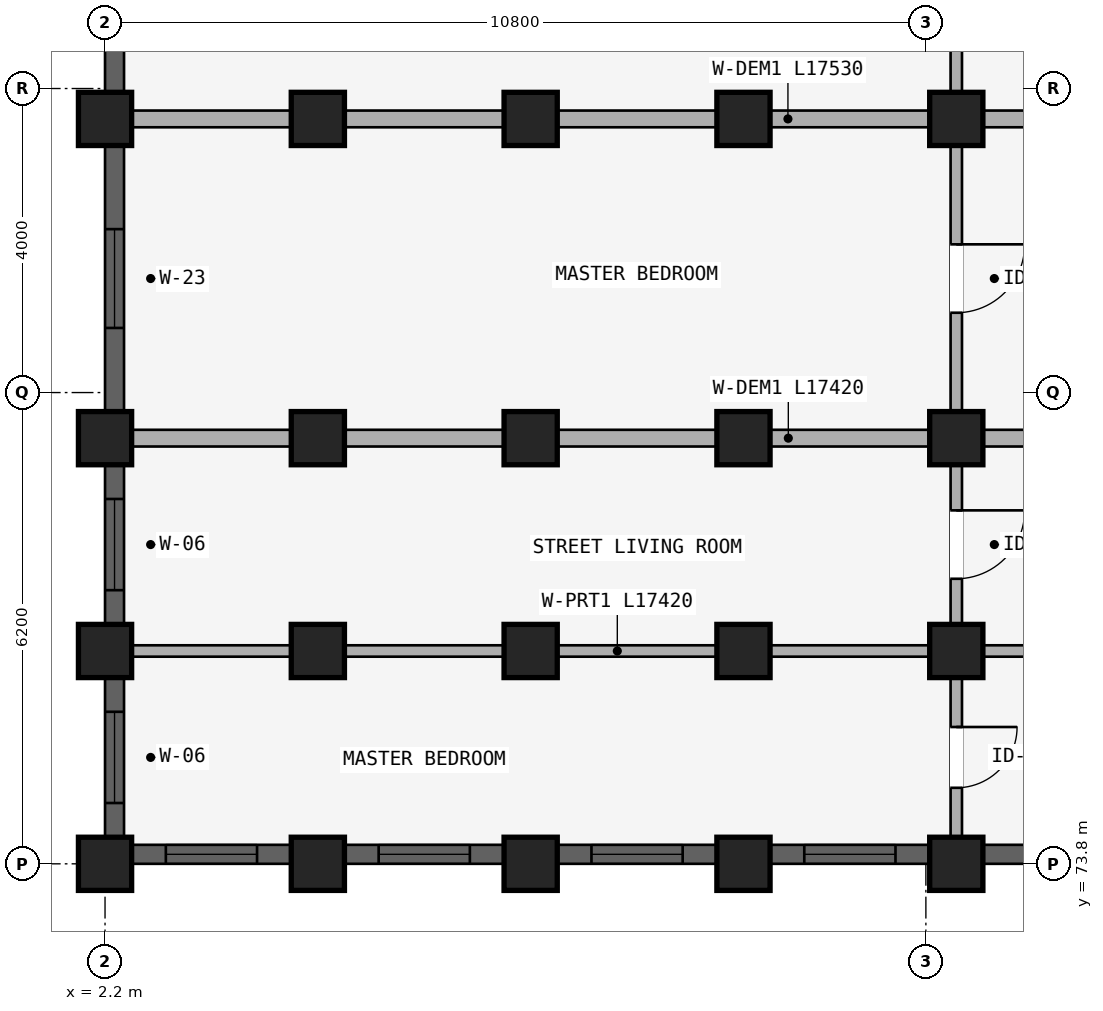
"""IFC4 building model, lengths in metres.
Left out: names, types, materials, properties, quantities, classifications, styles, units other than length and angle.
Written with IfcOpenShell. Run it as: python <this file> out.ifc"""

import sys

from ifc_helpers import new_model, si_unit, direction, frame, frame_2d, origin, origin_2d, place, context, subcontext, project, spatial, rectangle, extrude, element, fill, save


model = new_model("IFC4")
c1 = context("Model", 3, precision=1e-05, world=origin(), true_north=direction((0.0, 1.0)))
c2 = subcontext(c1, "Body", "Model", "MODEL_VIEW")
j1 = project(units=[si_unit("LENGTHUNIT", "METRE"), si_unit("PLANEANGLEUNIT", "RADIAN")], contexts=[c1])
p1 = place(None, origin())
s1 = spatial("IfcSite", under=j1, at=p1, CompositionType="ELEMENT")
p2 = place(p1, origin())
s2 = spatial("IfcBuilding", under=s1, at=p2, CompositionType="ELEMENT")
p3 = place(p2, frame((0.0, 0.0, 18.15)))
s3 = spatial("IfcBuildingStorey", under=s2, at=p3, CompositionType="ELEMENT", Elevation=18.15)
for number, where, z_axis, x_axis in (
    (1, (13.4, 83.6, 0.0), (0.0, 0.0, 1.0), (1.0, 0.0, 0.0)),
    (2, (10.6, 83.6, 0.0), (0.0, 0.0, 1.0), (1.0, 0.0, 0.0)),
    (3, (7.8, 83.6, 0.0), (0.0, 0.0, 1.0), (1.0, 0.0, 0.0)),
    (4, (5.0, 83.6, 0.0), (0.0, 0.0, 1.0), (1.0, 0.0, 0.0)),
    (5, (2.2, 83.6, 0.0), (0.0, 0.0, 1.0), (1.0, 0.0, 0.0)),
    (6, (13.4, 79.4, 0.0), (0.0, 0.0, 1.0), (1.0, 0.0, 0.0)),
    (7, (10.6, 79.4, 0.0), (0.0, 0.0, 1.0), (1.0, 0.0, 0.0)),
    (8, (7.8, 79.4, 0.0), (0.0, 0.0, 1.0), (1.0, 0.0, 0.0)),
    (9, (5.0, 79.4, 0.0), (0.0, 0.0, 1.0), (1.0, 0.0, 0.0)),
    (10, (2.2, 79.4, 0.0), (0.0, 0.0, 1.0), (1.0, 0.0, 0.0)),
    (11, (13.4, 76.6, 0.0), (0.0, 0.0, 1.0), (1.0, 0.0, 0.0)),
    (12, (10.6, 76.6, 0.0), (0.0, 0.0, 1.0), (1.0, 0.0, 0.0)),
    (13, (7.8, 76.6, 0.0), (0.0, 0.0, 1.0), (1.0, 0.0, 0.0)),
    (14, (5.0, 76.6, 0.0), (0.0, 0.0, 1.0), (1.0, 0.0, 0.0)),
    (15, (2.2, 76.6, 0.0), (0.0, 0.0, 1.0), (1.0, 0.0, 0.0)),
    (16, (13.4, 73.8, 0.0), (0.0, 0.0, 1.0), (1.0, 0.0, 0.0)),
    (17, (10.6, 73.8, 0.0), (0.0, 0.0, 1.0), (1.0, 0.0, 0.0)),
    (18, (7.8, 73.8, 0.0), (0.0, 0.0, 1.0), (1.0, 0.0, 0.0)),
    (19, (5.0, 73.8, 0.0), (0.0, 0.0, 1.0), (1.0, 0.0, 0.0)),
    (20, (2.2, 73.8, 0.0), (0.0, 0.0, 1.0), (1.0, 0.0, 0.0)),
):
    element("IfcColumn", number, at=place(p3, frame(where, z_axis=z_axis, x_axis=x_axis)), inside=s3, PredefinedType="COLUMN", context=c2, shape_type="SweptSolid", body=[
        extrude(rectangle(XDim=0.7, YDim=0.7, at=origin_2d()), origin(), (0.0, 0.0, 1.0), 2.93),
    ])
p4 = place(p3, frame((13.4, 87.57, 0.0), z_axis=(0.0, 0.0, 1.0), x_axis=(0.0, -1.0, 0.0)))
e21 = element("IfcWall", 21, at=p4, inside=s3, PredefinedType="PARTITIONING", context=c2, shape_type="SweptSolid", body=[
    extrude(rectangle(XDim=3.89, YDim=0.15, at=frame_2d((1.945, 0.0))), origin(), (0.0, 0.0, 1.0), 2.372),
])
p5 = place(p4, frame((1.495, 0.0, 0.0)))
e22 = element("IfcOpeningElement", 22, at=p5, cuts=e21, PredefinedType="OPENING", context=c2, shape_type="SweptSolid", body=[
    extrude(rectangle(XDim=0.9, YDim=2.1, at=frame_2d((0.45, 1.05))), frame((0.0, 0.085, 0.0), z_axis=(0.0, -1.0, 0.0), x_axis=(1.0, 0.0, 0.0)), (0.0, 0.0, 1.0), 0.17),
])
p6 = place(p3, frame((13.4, 83.52, 0.0), z_axis=(0.0, 0.0, 1.0), x_axis=(0.0, -1.0, 0.0)))
e23 = element("IfcWall", 23, at=p6, inside=s3, PredefinedType="PARTITIONING", context=c2, shape_type="SweptSolid", body=[
    extrude(rectangle(XDim=4.04, YDim=0.15, at=frame_2d((2.02, 0.0))), origin(), (0.0, 0.0, 1.0), 2.372),
])
p7 = place(p6, frame((1.57, 0.0, 0.0)))
e24 = element("IfcOpeningElement", 24, at=p7, cuts=e23, PredefinedType="OPENING", context=c2, shape_type="SweptSolid", body=[
    extrude(rectangle(XDim=0.9, YDim=2.1, at=frame_2d((0.45, 1.05))), frame((0.0, 0.085, 0.0), z_axis=(0.0, -1.0, 0.0), x_axis=(1.0, 0.0, 0.0)), (0.0, 0.0, 1.0), 0.17),
])
p8 = place(p3, frame((19.95, 83.6, 0.0), z_axis=(0.0, 0.0, 1.0), x_axis=(-1.0, 0.0, 0.0)))
e25 = element("IfcWall", 25, at=p8, inside=s3, PredefinedType="STANDARD", context=c2, shape_type="SweptSolid", body=[
    extrude(rectangle(XDim=17.53, YDim=0.22, at=frame_2d((8.765, 0.0))), origin(), (0.0, 0.0, 1.0), 2.372),
])
p9 = place(p3, frame((13.4, 79.32, 0.0), z_axis=(0.0, 0.0, 1.0), x_axis=(0.0, -1.0, 0.0)))
e26 = element("IfcWall", 26, at=p9, inside=s3, PredefinedType="PLUMBINGWALL", context=c2, shape_type="SweptSolid", body=[
    extrude(rectangle(XDim=2.64, YDim=0.15, at=frame_2d((1.32, 0.0))), origin(), (0.0, 0.0, 1.0), 2.372),
])
p10 = place(p9, frame((0.87, 0.0, 0.0)))
e27 = element("IfcOpeningElement", 27, at=p10, cuts=e26, PredefinedType="OPENING", context=c2, shape_type="SweptSolid", body=[
    extrude(rectangle(XDim=0.9, YDim=2.1, at=frame_2d((0.45, 1.05))), frame((0.0, 0.085, 0.0), z_axis=(0.0, -1.0, 0.0), x_axis=(1.0, 0.0, 0.0)), (0.0, 0.0, 1.0), 0.17),
])
p11 = place(p3, frame((19.9, 79.4, 0.0), z_axis=(0.0, 0.0, 1.0), x_axis=(-1.0, 0.0, 0.0)))
e28 = element("IfcWall", 28, at=p11, inside=s3, PredefinedType="STANDARD", context=c2, shape_type="SweptSolid", body=[
    extrude(rectangle(XDim=17.42, YDim=0.22, at=frame_2d((8.71, 0.0))), origin(), (0.0, 0.0, 1.0), 2.372),
])
p12 = place(p3, frame((13.4, 76.52, 0.0), z_axis=(0.0, 0.0, 1.0), x_axis=(0.0, -1.0, 0.0)))
e29 = element("IfcWall", 29, at=p12, inside=s3, PredefinedType="PLUMBINGWALL", context=c2, shape_type="SweptSolid", body=[
    extrude(rectangle(XDim=2.64, YDim=0.15, at=frame_2d((1.32, 0.0))), origin(), (0.0, 0.0, 1.0), 2.372),
])
p13 = place(p12, frame((0.92, 0.0, 0.0)))
e30 = element("IfcOpeningElement", 30, at=p13, cuts=e29, PredefinedType="OPENING", context=c2, shape_type="SweptSolid", body=[
    extrude(rectangle(XDim=0.8, YDim=2.1, at=frame_2d((0.4, 1.05))), frame((0.0, 0.085, 0.0), z_axis=(0.0, -1.0, 0.0), x_axis=(1.0, 0.0, 0.0)), (0.0, 0.0, 1.0), 0.17),
])
p14 = place(p3, frame((19.9, 76.6, 0.0), z_axis=(0.0, 0.0, 1.0), x_axis=(-1.0, 0.0, 0.0)))
e31 = element("IfcWall", 31, at=p14, inside=s3, PredefinedType="PARTITIONING", context=c2, shape_type="SweptSolid", body=[
    extrude(rectangle(XDim=17.42, YDim=0.15, at=frame_2d((8.71, 0.0))), origin(), (0.0, 0.0, 1.0), 2.372),
])
p15 = place(p14, frame((2.75, 0.0, 0.0)))
e32 = element("IfcOpeningElement", 32, at=p15, cuts=e31, PredefinedType="OPENING", context=c2, shape_type="SweptSolid", body=[
    extrude(rectangle(XDim=0.9, YDim=2.1, at=frame_2d((0.45, 1.05))), frame((0.0, 0.085, 0.0), z_axis=(0.0, -1.0, 0.0), x_axis=(1.0, 0.0, 0.0)), (0.0, 0.0, 1.0), 0.17),
])
p16 = place(p3, frame((2.325, 87.447, 0.0), z_axis=(0.0, 0.0, 1.0), x_axis=(0.0, -1.0, 0.0)))
e33 = element("IfcWall", 33, at=p16, inside=s3, PredefinedType="STANDARD", context=c2, shape_type="SweptSolid", body=[
    extrude(rectangle(XDim=3.493, YDim=0.25, at=frame_2d((1.747, 0.0))), origin(), (0.0, 0.0, 1.0), 2.472),
])
p17 = place(p16, frame((1.096, 0.0, 0.88)))
e34 = element("IfcOpeningElement", 34, at=p17, cuts=e33, PredefinedType="OPENING", context=c2, shape_type="SweptSolid", body=[
    extrude(rectangle(XDim=1.3, YDim=1.4, at=frame_2d((0.65, 0.7))), frame((0.0, 0.135, 0.0), z_axis=(0.0, -1.0, 0.0), x_axis=(1.0, 0.0, 0.0)), (0.0, 0.0, 1.0), 0.27),
])
p18 = place(p3, frame((2.325, 83.247, 0.0), z_axis=(0.0, 0.0, 1.0), x_axis=(0.0, -1.0, 0.0)))
e35 = element("IfcWall", 35, at=p18, inside=s3, PredefinedType="STANDARD", context=c2, shape_type="SweptSolid", body=[
    extrude(rectangle(XDim=3.493, YDim=0.25, at=frame_2d((1.747, 0.0))), origin(), (0.0, 0.0, 1.0), 2.472),
])
p19 = place(p18, frame((1.096, 0.0, 0.88)))
e36 = element("IfcOpeningElement", 36, at=p19, cuts=e35, PredefinedType="OPENING", context=c2, shape_type="SweptSolid", body=[
    extrude(rectangle(XDim=1.3, YDim=1.4, at=frame_2d((0.65, 0.7))), frame((0.0, 0.135, 0.0), z_axis=(0.0, -1.0, 0.0), x_axis=(1.0, 0.0, 0.0)), (0.0, 0.0, 1.0), 0.27),
])
p20 = place(p3, frame((2.325, 79.046, 0.0), z_axis=(0.0, 0.0, 1.0), x_axis=(0.0, -1.0, 0.0)))
e37 = element("IfcWall", 37, at=p20, inside=s3, PredefinedType="STANDARD", context=c2, shape_type="SweptSolid", body=[
    extrude(rectangle(XDim=2.093, YDim=0.25, at=frame_2d((1.046, 0.0))), origin(), (0.0, 0.0, 1.0), 2.472),
])
p21 = place(p20, frame((0.447, 0.0, 0.772)))
e38 = element("IfcOpeningElement", 38, at=p21, cuts=e37, PredefinedType="OPENING", context=c2, shape_type="SweptSolid", body=[
    extrude(rectangle(XDim=1.2, YDim=1.5, at=frame_2d((0.6, 0.75))), frame((0.0, 0.135, 0.0), z_axis=(0.0, -1.0, 0.0), x_axis=(1.0, 0.0, 0.0)), (0.0, 0.0, 1.0), 0.27),
])
p22 = place(p3, frame((2.325, 76.247, 0.0), z_axis=(0.0, 0.0, 1.0), x_axis=(0.0, -1.0, 0.0)))
e39 = element("IfcWall", 39, at=p22, inside=s3, PredefinedType="STANDARD", context=c2, shape_type="SweptSolid", body=[
    extrude(rectangle(XDim=2.093, YDim=0.25, at=frame_2d((1.046, 0.0))), origin(), (0.0, 0.0, 1.0), 2.472),
])
p23 = place(p22, frame((0.447, 0.0, 0.772)))
e40 = element("IfcOpeningElement", 40, at=p23, cuts=e39, PredefinedType="OPENING", context=c2, shape_type="SweptSolid", body=[
    extrude(rectangle(XDim=1.2, YDim=1.5, at=frame_2d((0.6, 0.75))), frame((0.0, 0.135, 0.0), z_axis=(0.0, -1.0, 0.0), x_axis=(1.0, 0.0, 0.0)), (0.0, 0.0, 1.0), 0.27),
])
p24 = place(p3, frame((19.771, 73.925, 0.0), z_axis=(0.0, 0.0, 1.0), x_axis=(-1.0, 0.0, 0.0)))
e41 = element("IfcWall", 41, at=p24, inside=s3, PredefinedType="STANDARD", context=c2, shape_type="SweptSolid", body=[
    extrude(rectangle(XDim=6.018, YDim=0.25, at=frame_2d((3.009, 0.0))), origin(), (0.0, 0.0, 1.0), 2.372),
])
p25 = place(p24, frame((2.322, 0.0, 0.522)))
e42 = element("IfcOpeningElement", 42, at=p25, cuts=e41, PredefinedType="OPENING", context=c2, shape_type="SweptSolid", body=[
    extrude(rectangle(XDim=1.5, YDim=1.65, at=frame_2d((0.75, 0.825))), frame((0.0, 0.135, 0.0), z_axis=(0.0, -1.0, 0.0), x_axis=(1.0, 0.0, 0.0)), (0.0, 0.0, 1.0), 0.27),
])
p26 = place(p3, frame((13.046, 73.925, 0.0), z_axis=(0.0, 0.0, 1.0), x_axis=(-1.0, 0.0, 0.0)))
e43 = element("IfcWall", 43, at=p26, inside=s3, PredefinedType="STANDARD", context=c2, shape_type="SweptSolid", body=[
    extrude(rectangle(XDim=2.093, YDim=0.25, at=frame_2d((1.046, 0.0))), origin(), (0.0, 0.0, 1.0), 2.372),
])
p27 = place(p26, frame((0.447, 0.0, 0.672)))
e44 = element("IfcOpeningElement", 44, at=p27, cuts=e43, PredefinedType="OPENING", context=c2, shape_type="SweptSolid", body=[
    extrude(rectangle(XDim=1.2, YDim=1.5, at=frame_2d((0.6, 0.75))), frame((0.0, 0.135, 0.0), z_axis=(0.0, -1.0, 0.0), x_axis=(1.0, 0.0, 0.0)), (0.0, 0.0, 1.0), 0.27),
])
p28 = place(p3, frame((10.247, 73.925, 0.0), z_axis=(0.0, 0.0, 1.0), x_axis=(-1.0, 0.0, 0.0)))
e45 = element("IfcWall", 45, at=p28, inside=s3, PredefinedType="STANDARD", context=c2, shape_type="SweptSolid", body=[
    extrude(rectangle(XDim=2.093, YDim=0.25, at=frame_2d((1.046, 0.0))), origin(), (0.0, 0.0, 1.0), 2.372),
])
p29 = place(p28, frame((0.447, 0.0, 0.672)))
e46 = element("IfcOpeningElement", 46, at=p29, cuts=e45, PredefinedType="OPENING", context=c2, shape_type="SweptSolid", body=[
    extrude(rectangle(XDim=1.2, YDim=1.5, at=frame_2d((0.6, 0.75))), frame((0.0, 0.135, 0.0), z_axis=(0.0, -1.0, 0.0), x_axis=(1.0, 0.0, 0.0)), (0.0, 0.0, 1.0), 0.27),
])
p30 = place(p3, frame((7.447, 73.925, 0.0), z_axis=(0.0, 0.0, 1.0), x_axis=(-1.0, 0.0, 0.0)))
e47 = element("IfcWall", 47, at=p30, inside=s3, PredefinedType="STANDARD", context=c2, shape_type="SweptSolid", body=[
    extrude(rectangle(XDim=2.093, YDim=0.25, at=frame_2d((1.046, 0.0))), origin(), (0.0, 0.0, 1.0), 2.372),
])
p31 = place(p30, frame((0.447, 0.0, 0.672)))
e48 = element("IfcOpeningElement", 48, at=p31, cuts=e47, PredefinedType="OPENING", context=c2, shape_type="SweptSolid", body=[
    extrude(rectangle(XDim=1.2, YDim=1.5, at=frame_2d((0.6, 0.75))), frame((0.0, 0.135, 0.0), z_axis=(0.0, -1.0, 0.0), x_axis=(1.0, 0.0, 0.0)), (0.0, 0.0, 1.0), 0.27),
])
p32 = place(p3, frame((4.646, 73.925, 0.0), z_axis=(0.0, 0.0, 1.0), x_axis=(-1.0, 0.0, 0.0)))
e49 = element("IfcWall", 49, at=p32, inside=s3, PredefinedType="STANDARD", context=c2, shape_type="SweptSolid", body=[
    extrude(rectangle(XDim=2.093, YDim=0.25, at=frame_2d((1.046, 0.0))), origin(), (0.0, 0.0, 1.0), 2.372),
])
p33 = place(p32, frame((0.447, 0.0, 0.672)))
e50 = element("IfcOpeningElement", 50, at=p33, cuts=e49, PredefinedType="OPENING", context=c2, shape_type="SweptSolid", body=[
    extrude(rectangle(XDim=1.2, YDim=1.5, at=frame_2d((0.6, 0.75))), frame((0.0, 0.135, 0.0), z_axis=(0.0, -1.0, 0.0), x_axis=(1.0, 0.0, 0.0)), (0.0, 0.0, 1.0), 0.27),
])
p34 = place(p19, origin())
e51 = element("IfcWindow", 51, at=p34, inside=s3, PartitioningType="DOUBLE_PANEL_HORIZONTAL", PredefinedType="WINDOW", context=c2, shape_type="SweptSolid", body=[
    extrude(rectangle(XDim=1.3, YDim=1.4, at=frame_2d((0.65, 0.7))), frame((0.0, 0.03, 0.0), z_axis=(0.0, -1.0, 0.0), x_axis=(1.0, 0.0, 0.0)), (0.0, 0.0, 1.0), 0.06),
])
fill(e36, e51)
p35 = place(p21, origin())
e52 = element("IfcWindow", 52, at=p35, inside=s3, PartitioningType="SINGLE_PANEL", PredefinedType="WINDOW", context=c2, shape_type="SweptSolid", body=[
    extrude(rectangle(XDim=1.2, YDim=1.5, at=frame_2d((0.6, 0.75))), frame((0.0, 0.03, 0.0), z_axis=(0.0, -1.0, 0.0), x_axis=(1.0, 0.0, 0.0)), (0.0, 0.0, 1.0), 0.06),
])
fill(e38, e52)
p36 = place(p23, origin())
e53 = element("IfcWindow", 53, at=p36, inside=s3, PartitioningType="SINGLE_PANEL", PredefinedType="WINDOW", context=c2, shape_type="SweptSolid", body=[
    extrude(rectangle(XDim=1.2, YDim=1.5, at=frame_2d((0.6, 0.75))), frame((0.0, 0.03, 0.0), z_axis=(0.0, -1.0, 0.0), x_axis=(1.0, 0.0, 0.0)), (0.0, 0.0, 1.0), 0.06),
])
fill(e40, e53)
p37 = place(p27, origin())
e54 = element("IfcWindow", 54, at=p37, inside=s3, PartitioningType="SINGLE_PANEL", PredefinedType="WINDOW", context=c2, shape_type="SweptSolid", body=[
    extrude(rectangle(XDim=1.2, YDim=1.5, at=frame_2d((0.6, 0.75))), frame((0.0, 0.03, 0.0), z_axis=(0.0, -1.0, 0.0), x_axis=(1.0, 0.0, 0.0)), (0.0, 0.0, 1.0), 0.06),
])
fill(e44, e54)
p38 = place(p29, origin())
e55 = element("IfcWindow", 55, at=p38, inside=s3, PartitioningType="SINGLE_PANEL", PredefinedType="WINDOW", context=c2, shape_type="SweptSolid", body=[
    extrude(rectangle(XDim=1.2, YDim=1.5, at=frame_2d((0.6, 0.75))), frame((0.0, 0.03, 0.0), z_axis=(0.0, -1.0, 0.0), x_axis=(1.0, 0.0, 0.0)), (0.0, 0.0, 1.0), 0.06),
])
fill(e46, e55)
p39 = place(p31, origin())
e56 = element("IfcWindow", 56, at=p39, inside=s3, PartitioningType="SINGLE_PANEL", PredefinedType="WINDOW", context=c2, shape_type="SweptSolid", body=[
    extrude(rectangle(XDim=1.2, YDim=1.5, at=frame_2d((0.6, 0.75))), frame((0.0, 0.03, 0.0), z_axis=(0.0, -1.0, 0.0), x_axis=(1.0, 0.0, 0.0)), (0.0, 0.0, 1.0), 0.06),
])
fill(e48, e56)
p40 = place(p33, origin())
e57 = element("IfcWindow", 57, at=p40, inside=s3, PartitioningType="SINGLE_PANEL", PredefinedType="WINDOW", context=c2, shape_type="SweptSolid", body=[
    extrude(rectangle(XDim=1.2, YDim=1.5, at=frame_2d((0.6, 0.75))), frame((0.0, 0.03, 0.0), z_axis=(0.0, -1.0, 0.0), x_axis=(1.0, 0.0, 0.0)), (0.0, 0.0, 1.0), 0.06),
])
fill(e50, e57)
p41 = place(p7, frame((0.9, 0.0, 0.0), z_axis=(0.0, 0.0, 1.0), x_axis=(-1.0, 0.0, 0.0)))
e58 = element("IfcDoor", 58, at=p41, inside=s3, OperationType="SINGLE_SWING_RIGHT", PredefinedType="DOOR", context=c2, shape_type="SweptSolid", body=[
    extrude(rectangle(XDim=0.9, YDim=2.1, at=frame_2d((0.45, 1.05))), frame((0.0, 0.025, 0.0), z_axis=(0.0, -1.0, 0.0), x_axis=(1.0, 0.0, 0.0)), (0.0, 0.0, 1.0), 0.05),
])
fill(e24, e58)
p42 = place(p10, frame((0.9, 0.0, 0.0), z_axis=(0.0, 0.0, 1.0), x_axis=(-1.0, 0.0, 0.0)))
e59 = element("IfcDoor", 59, at=p42, inside=s3, OperationType="SINGLE_SWING_RIGHT", PredefinedType="DOOR", context=c2, shape_type="SweptSolid", body=[
    extrude(rectangle(XDim=0.9, YDim=2.1, at=frame_2d((0.45, 1.05))), frame((0.0, 0.025, 0.0), z_axis=(0.0, -1.0, 0.0), x_axis=(1.0, 0.0, 0.0)), (0.0, 0.0, 1.0), 0.05),
])
fill(e27, e59)
p43 = place(p13, frame((0.8, 0.0, 0.0), z_axis=(0.0, 0.0, 1.0), x_axis=(-1.0, 0.0, 0.0)))
e60 = element("IfcDoor", 60, at=p43, inside=s3, OperationType="SINGLE_SWING_RIGHT", PredefinedType="DOOR", context=c2, shape_type="SweptSolid", body=[
    extrude(rectangle(XDim=0.8, YDim=2.1, at=frame_2d((0.4, 1.05))), frame((0.0, 0.025, 0.0), z_axis=(0.0, -1.0, 0.0), x_axis=(1.0, 0.0, 0.0)), (0.0, 0.0, 1.0), 0.05),
])
fill(e30, e60)
save(model, sys.argv[1])
